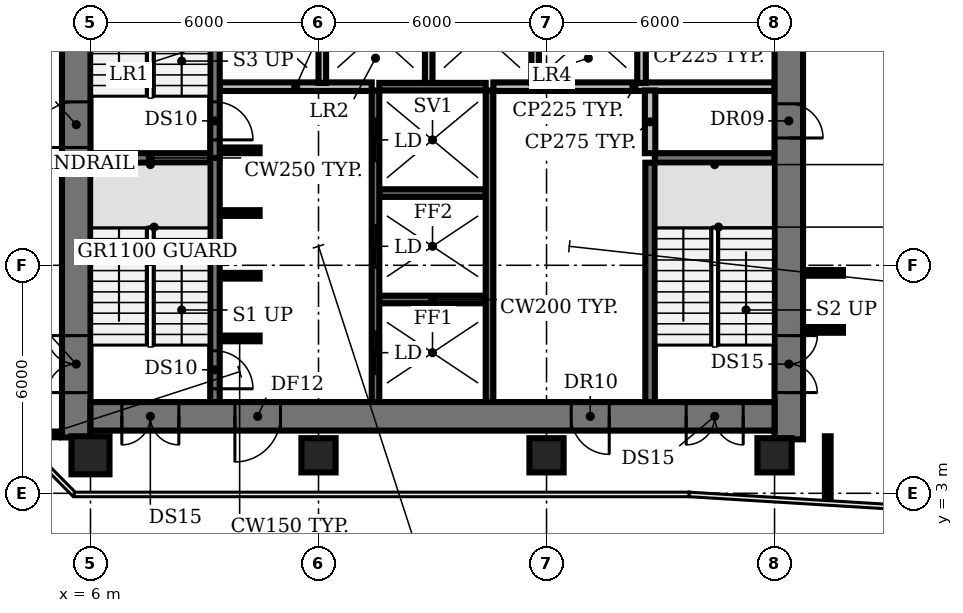
"""IFC4 building model, lengths in metres.
Left out: names, types, materials, properties, quantities, classifications, styles, units other than length and angle.
Written with IfcOpenShell. Run it as: python <this file> out.ifc"""

import sys

from ifc_helpers import new_model, si_unit, direction, frame, frame_2d, origin, origin_2d, place, context, subcontext, project, spatial, rectangle, circle, extrude, element, fill, save


model = new_model("IFC4")
c1 = context("Model", 3, precision=1e-05, world=origin(), true_north=direction((0.0, 1.0)))
c2 = subcontext(c1, "Body", "Model", "MODEL_VIEW")
j1 = project(units=[si_unit("LENGTHUNIT", "METRE"), si_unit("PLANEANGLEUNIT", "RADIAN")], contexts=[c1])
p1 = place(None, origin())
s1 = spatial("IfcSite", under=j1, at=p1, CompositionType="ELEMENT")
p2 = place(p1, origin())
s2 = spatial("IfcBuilding", under=s1, at=p2, CompositionType="ELEMENT")
p3 = place(p2, frame((0.0, 0.0, 125.6)))
s3 = spatial("IfcBuildingStorey", under=s2, at=p3, CompositionType="ELEMENT", Elevation=125.6)
p4 = place(p3, frame((6.0, 4.0, 0.0), z_axis=(0.0, 0.0, 1.0), x_axis=(1.0, 0.0, 0.0)))
e1 = element("IfcColumn", 1, at=p4, inside=s3, PredefinedType="COLUMN", context=c2, shape_type="SweptSolid", body=[
    extrude(circle(Radius=0.5, at=origin_2d()), origin(), (0.0, 0.0, 1.0), 3.85),
])
for number, where, z_axis, x_axis in (
    (2, (12.0, 4.0, 0.0), (0.0, 0.0, 1.0), (1.0, 0.0, 0.0)),
    (3, (18.0, 4.0, 0.0), (0.0, 0.0, 1.0), (1.0, 0.0, 0.0)),
    (4, (24.0, 4.0, 0.0), (0.0, 0.0, 1.0), (1.0, 0.0, 0.0)),
):
    element("IfcColumn", number, at=place(p3, frame(where, z_axis=z_axis, x_axis=x_axis)), inside=s3, PredefinedType="COLUMN", context=c2, shape_type="SweptSolid", body=[
        extrude(rectangle(XDim=0.9, YDim=0.9, at=origin_2d()), origin(), (0.0, 0.0, 1.0), 3.85),
    ])
p5 = place(p3, frame((9.4, 7.075, 0.0), z_axis=(0.0, 0.0, 1.0), x_axis=(1.0, 0.0, 0.0)))
e5 = element("IfcWall", 5, at=p5, inside=s3, PredefinedType="SHEAR", context=c2, shape_type="SweptSolid", body=[
    extrude(rectangle(XDim=1.05, YDim=0.15, at=frame_2d((0.525, 0.0))), origin(), (0.0, 0.0, 1.0), 3.85),
])
p6 = place(p3, frame((13.6, 8.1, 0.0), z_axis=(0.0, 0.0, 1.0), x_axis=(1.0, 0.0, 0.0)))
e6 = element("IfcWall", 6, at=p6, inside=s3, PredefinedType="SHEAR", context=c2, shape_type="SweptSolid", body=[
    extrude(rectangle(XDim=2.8, YDim=0.2, at=frame_2d((1.4, 0.0))), origin(), (0.0, 0.0, 1.0), 3.85),
])
for number, where, z_axis, x_axis in (
    (7, (9.4, 8.725, 0.0), (0.0, 0.0, 1.0), (1.0, 0.0, 0.0)),
    (8, (9.4, 10.375, 0.0), (0.0, 0.0, 1.0), (1.0, 0.0, 0.0)),
):
    element("IfcWall", number, at=place(p3, frame(where, z_axis=z_axis, x_axis=x_axis)), inside=s3, PredefinedType="SHEAR", context=c2, shape_type="SweptSolid", body=[
        extrude(rectangle(XDim=1.05, YDim=0.15, at=frame_2d((0.525, 0.0))), origin(), (0.0, 0.0, 1.0), 3.85),
    ])
p7 = place(p3, frame((13.6, 10.9, 0.0), z_axis=(0.0, 0.0, 1.0), x_axis=(1.0, 0.0, 0.0)))
e9 = element("IfcWall", 9, at=p7, inside=s3, PredefinedType="SHEAR", context=c2, shape_type="SweptSolid", body=[
    extrude(rectangle(XDim=2.8, YDim=0.2, at=frame_2d((1.4, 0.0))), origin(), (0.0, 0.0, 1.0), 3.85),
])
for number, where, z_axis, x_axis in (
    (10, (6.0, 11.825, 0.0), (0.0, 0.0, 1.0), (1.0, 0.0, 0.0)),
    (11, (20.85, 11.825, 0.0), (0.0, 0.0, 1.0), (1.0, 0.0, 0.0)),
):
    element("IfcWall", number, at=place(p3, frame(where, z_axis=z_axis, x_axis=x_axis)), inside=s3, PredefinedType="SHEAR", context=c2, shape_type="SweptSolid", body=[
        extrude(rectangle(XDim=3.15, YDim=0.25, at=frame_2d((1.575, 0.0))), origin(), (0.0, 0.0, 1.0), 3.85),
    ])
p8 = place(p3, frame((9.4, 12.025, 0.0), z_axis=(0.0, 0.0, 1.0), x_axis=(1.0, 0.0, 0.0)))
e12 = element("IfcWall", 12, at=p8, inside=s3, PredefinedType="SHEAR", context=c2, shape_type="SweptSolid", body=[
    extrude(rectangle(XDim=1.05, YDim=0.15, at=frame_2d((0.525, 0.0))), origin(), (0.0, 0.0, 1.0), 3.85),
])
p9 = place(p3, frame((9.4, 13.7, 0.0), z_axis=(0.0, 0.0, 1.0), x_axis=(1.0, 0.0, 0.0)))
e13 = element("IfcWall", 13, at=p9, inside=s3, PredefinedType="PARTITIONING", context=c2, shape_type="SweptSolid", body=[
    extrude(rectangle(XDim=4.0, YDim=0.225, at=frame_2d((2.0, 0.0))), origin(), (0.0, 0.0, 1.0), 3.85),
])
p10 = place(p3, frame((13.6, 13.7, 0.0), z_axis=(0.0, 0.0, 1.0), x_axis=(1.0, 0.0, 0.0)))
e14 = element("IfcWall", 14, at=p10, inside=s3, PredefinedType="SHEAR", context=c2, shape_type="SweptSolid", body=[
    extrude(rectangle(XDim=2.8, YDim=0.2, at=frame_2d((1.4, 0.0))), origin(), (0.0, 0.0, 1.0), 3.85),
])
p11 = place(p3, frame((16.6, 13.7, 0.0), z_axis=(0.0, 0.0, 1.0), x_axis=(1.0, 0.0, 0.0)))
e15 = element("IfcWall", 15, at=p11, inside=s3, PredefinedType="PARTITIONING", context=c2, shape_type="SweptSolid", body=[
    extrude(rectangle(XDim=7.4, YDim=0.225, at=frame_2d((3.7, 0.0))), origin(), (0.0, 0.0, 1.0), 3.85),
])
p12 = place(p3, frame((9.275, 11.825, 0.0), z_axis=(0.0, 0.0, 1.0), x_axis=(0.0, -1.0, 0.0)))
e16 = element("IfcWall", 16, at=p12, inside=s3, PredefinedType="SHEAR", context=c2, shape_type="SweptSolid", body=[
    extrude(rectangle(XDim=6.425, YDim=0.25, at=frame_2d((3.212, 0.0))), origin(), (0.0, 0.0, 1.0), 3.85),
])
p13 = place(p12, frame((5.075, 0.0, 0.0)))
e17 = element("IfcOpeningElement", 17, at=p13, cuts=e16, PredefinedType="OPENING", context=c2, shape_type="SweptSolid", body=[
    extrude(rectangle(XDim=1.0, YDim=2.1, at=frame_2d((0.5, 1.05))), frame((0.0, 0.135, 0.0), z_axis=(0.0, -1.0, 0.0), x_axis=(1.0, 0.0, 0.0)), (0.0, 0.0, 1.0), 0.27),
])
p14 = place(p3, frame((9.275, 18.375, 0.0), z_axis=(0.0, 0.0, 1.0), x_axis=(0.0, -1.0, 0.0)))
e18 = element("IfcWall", 18, at=p14, inside=s3, PredefinedType="SHEAR", context=c2, shape_type="SweptSolid", body=[
    extrude(rectangle(XDim=6.55, YDim=0.25, at=frame_2d((3.275, 0.0))), origin(), (0.0, 0.0, 1.0), 3.85),
])
p15 = place(p14, frame((5.075, 0.0, 0.0)))
e19 = element("IfcOpeningElement", 19, at=p15, cuts=e18, PredefinedType="OPENING", context=c2, shape_type="SweptSolid", body=[
    extrude(rectangle(XDim=1.0, YDim=2.1, at=frame_2d((0.5, 1.05))), frame((0.0, 0.135, 0.0), z_axis=(0.0, -1.0, 0.0), x_axis=(1.0, 0.0, 0.0)), (0.0, 0.0, 1.0), 0.27),
])
p16 = place(p3, frame((12.1, 13.8, 0.0), z_axis=(0.0, 0.0, 1.0), x_axis=(0.0, 1.0, 0.0)))
e20 = element("IfcWall", 20, at=p16, inside=s3, PredefinedType="SOLIDWALL", context=c2, shape_type="SweptSolid", body=[
    extrude(rectangle(XDim=2.6, YDim=0.2, at=frame_2d((1.3, 0.0))), origin(), (0.0, 0.0, 1.0), 3.85),
])
p17 = place(p3, frame((13.5, 5.4, 0.0), z_axis=(0.0, 0.0, 1.0), x_axis=(0.0, 1.0, 0.0)))
e21 = element("IfcWall", 21, at=p17, inside=s3, PredefinedType="SHEAR", context=c2, shape_type="SweptSolid", body=[
    extrude(rectangle(XDim=8.2, YDim=0.2, at=frame_2d((4.1, 0.0))), origin(), (0.0, 0.0, 1.0), 3.85),
])
p18 = place(p17, frame((0.75, 0.0, 0.0)))
e22 = element("IfcOpeningElement", 22, at=p18, cuts=e21, PredefinedType="OPENING", context=c2, shape_type="SweptSolid", body=[
    extrude(rectangle(XDim=1.1, YDim=2.1, at=frame_2d((0.55, 1.05))), frame((0.0, 0.11, 0.0), z_axis=(0.0, -1.0, 0.0), x_axis=(1.0, 0.0, 0.0)), (0.0, 0.0, 1.0), 0.22),
])
p19 = place(p17, frame((3.55, 0.0, 0.0)))
e23 = element("IfcOpeningElement", 23, at=p19, cuts=e21, PredefinedType="OPENING", context=c2, shape_type="SweptSolid", body=[
    extrude(rectangle(XDim=1.1, YDim=2.1, at=frame_2d((0.55, 1.05))), frame((0.0, 0.11, 0.0), z_axis=(0.0, -1.0, 0.0), x_axis=(1.0, 0.0, 0.0)), (0.0, 0.0, 1.0), 0.22),
])
p20 = place(p17, frame((6.35, 0.0, 0.0)))
e24 = element("IfcOpeningElement", 24, at=p20, cuts=e21, PredefinedType="OPENING", context=c2, shape_type="SweptSolid", body=[
    extrude(rectangle(XDim=1.1, YDim=2.1, at=frame_2d((0.55, 1.05))), frame((0.0, 0.11, 0.0), z_axis=(0.0, -1.0, 0.0), x_axis=(1.0, 0.0, 0.0)), (0.0, 0.0, 1.0), 0.22),
])
p21 = place(p3, frame((14.9, 13.8, 0.0), z_axis=(0.0, 0.0, 1.0), x_axis=(0.0, 1.0, 0.0)))
e25 = element("IfcWall", 25, at=p21, inside=s3, PredefinedType="SOLIDWALL", context=c2, shape_type="SweptSolid", body=[
    extrude(rectangle(XDim=2.6, YDim=0.2, at=frame_2d((1.3, 0.0))), origin(), (0.0, 0.0, 1.0), 3.85),
])
p22 = place(p3, frame((16.5, 5.4, 0.0), z_axis=(0.0, 0.0, 1.0), x_axis=(0.0, 1.0, 0.0)))
e26 = element("IfcWall", 26, at=p22, inside=s3, PredefinedType="SHEAR", context=c2, shape_type="SweptSolid", body=[
    extrude(rectangle(XDim=8.2, YDim=0.2, at=frame_2d((4.1, 0.0))), origin(), (0.0, 0.0, 1.0), 3.85),
])
p23 = place(p3, frame((17.7, 13.8, 0.0), z_axis=(0.0, 0.0, 1.0), x_axis=(0.0, 1.0, 0.0)))
e27 = element("IfcWall", 27, at=p23, inside=s3, PredefinedType="SOLIDWALL", context=c2, shape_type="SweptSolid", body=[
    extrude(rectangle(XDim=2.6, YDim=0.2, at=frame_2d((1.3, 0.0))), origin(), (0.0, 0.0, 1.0), 3.85),
])
p24 = place(p3, frame((20.5, 13.8, 0.0), z_axis=(0.0, 0.0, 1.0), x_axis=(0.0, 1.0, 0.0)))
e28 = element("IfcWall", 28, at=p24, inside=s3, PredefinedType="PARTITIONING", context=c2, shape_type="SweptSolid", body=[
    extrude(rectangle(XDim=2.6, YDim=0.225, at=frame_2d((1.3, 0.0))), origin(), (0.0, 0.0, 1.0), 3.85),
])
p25 = place(p3, frame((20.725, 5.4, 0.0), z_axis=(0.0, 0.0, 1.0), x_axis=(0.0, 1.0, 0.0)))
e29 = element("IfcWall", 29, at=p25, inside=s3, PredefinedType="SHEAR", context=c2, shape_type="SweptSolid", body=[
    extrude(rectangle(XDim=6.3, YDim=0.25, at=frame_2d((3.15, 0.0))), origin(), (0.0, 0.0, 1.0), 3.85),
])
p26 = place(p3, frame((20.725, 11.95, 0.0), z_axis=(0.0, 0.0, 1.0), x_axis=(0.0, 1.0, 0.0)))
e30 = element("IfcWall", 30, at=p26, inside=s3, PredefinedType="PARTITIONING", context=c2, shape_type="SweptSolid", body=[
    extrude(rectangle(XDim=1.65, YDim=0.275, at=frame_2d((0.825, 0.0))), origin(), (0.0, 0.0, 1.0), 3.85),
])
p27 = place(p3, frame((5.625, 4.47, 0.0), z_axis=(0.0, 0.0, 1.0), x_axis=(0.0, 1.0, 0.0)))
e31 = element("IfcWall", 31, at=p27, inside=s3, PredefinedType="SHEAR", context=c2, shape_type="SweptSolid", body=[
    extrude(rectangle(XDim=21.08, YDim=0.75, at=frame_2d((10.54, 0.0))), origin(), (0.0, 0.0, 1.0), 3.85),
])
p28 = place(p27, frame((1.18, 0.0, 0.0)))
e32 = element("IfcOpeningElement", 32, at=p28, cuts=e31, PredefinedType="OPENING", context=c2, shape_type="SweptSolid", body=[
    extrude(rectangle(XDim=1.5, YDim=2.1, at=frame_2d((0.75, 1.05))), frame((0.0, 0.385, 0.0), z_axis=(0.0, -1.0, 0.0), x_axis=(1.0, 0.0, 0.0)), (0.0, 0.0, 1.0), 0.77),
])
p29 = place(p27, frame((7.63, 0.0, 0.0)))
e33 = element("IfcOpeningElement", 33, at=p29, cuts=e31, PredefinedType="OPENING", context=c2, shape_type="SweptSolid", body=[
    extrude(rectangle(XDim=1.2, YDim=2.1, at=frame_2d((0.6, 1.05))), frame((0.0, 0.385, 0.0), z_axis=(0.0, -1.0, 0.0), x_axis=(1.0, 0.0, 0.0)), (0.0, 0.0, 1.0), 0.77),
])
p30 = place(p27, frame((14.18, 0.0, 0.0)))
e34 = element("IfcOpeningElement", 34, at=p30, cuts=e31, PredefinedType="OPENING", context=c2, shape_type="SweptSolid", body=[
    extrude(rectangle(XDim=1.2, YDim=2.1, at=frame_2d((0.6, 1.05))), frame((0.0, 0.385, 0.0), z_axis=(0.0, -1.0, 0.0), x_axis=(1.0, 0.0, 0.0)), (0.0, 0.0, 1.0), 0.77),
])
p31 = place(p3, frame((24.375, 25.55, 0.0), z_axis=(0.0, 0.0, 1.0), x_axis=(0.0, -1.0, 0.0)))
e35 = element("IfcWall", 35, at=p31, inside=s3, PredefinedType="SHEAR", context=c2, shape_type="SweptSolid", body=[
    extrude(rectangle(XDim=21.13, YDim=0.75, at=frame_2d((10.565, 0.0))), origin(), (0.0, 0.0, 1.0), 3.85),
])
p32 = place(p31, frame((18.4, 0.0, 0.0)))
e36 = element("IfcOpeningElement", 36, at=p32, cuts=e35, PredefinedType="OPENING", context=c2, shape_type="SweptSolid", body=[
    extrude(rectangle(XDim=1.5, YDim=2.1, at=frame_2d((0.75, 1.05))), frame((0.0, 0.385, 0.0), z_axis=(0.0, -1.0, 0.0), x_axis=(1.0, 0.0, 0.0)), (0.0, 0.0, 1.0), 0.77),
])
p33 = place(p31, frame((12.3, 0.0, 0.0)))
e37 = element("IfcOpeningElement", 37, at=p33, cuts=e35, PredefinedType="OPENING", context=c2, shape_type="SweptSolid", body=[
    extrude(rectangle(XDim=0.9, YDim=2.1, at=frame_2d((0.45, 1.05))), frame((0.0, 0.385, 0.0), z_axis=(0.0, -1.0, 0.0), x_axis=(1.0, 0.0, 0.0)), (0.0, 0.0, 1.0), 0.77),
])
p34 = place(p31, frame((6.3, 0.0, 0.0)))
e38 = element("IfcOpeningElement", 38, at=p34, cuts=e35, PredefinedType="OPENING", context=c2, shape_type="SweptSolid", body=[
    extrude(rectangle(XDim=2.0, YDim=2.1, at=frame_2d((1.0, 1.05))), frame((0.0, 0.385, 0.0), z_axis=(0.0, -1.0, 0.0), x_axis=(1.0, 0.0, 0.0)), (0.0, 0.0, 1.0), 0.77),
])
p35 = place(p3, frame((24.0, 5.025, 0.0), z_axis=(0.0, 0.0, 1.0), x_axis=(-1.0, 0.0, 0.0)))
e39 = element("IfcWall", 39, at=p35, inside=s3, PredefinedType="SHEAR", context=c2, shape_type="SweptSolid", body=[
    extrude(rectangle(XDim=18.0, YDim=0.75, at=frame_2d((9.0, 0.0))), origin(), (0.0, 0.0, 1.0), 3.85),
])
p36 = place(p35, frame((0.825, 0.0, 0.0)))
e40 = element("IfcOpeningElement", 40, at=p36, cuts=e39, PredefinedType="OPENING", context=c2, shape_type="SweptSolid", body=[
    extrude(rectangle(XDim=1.5, YDim=2.1, at=frame_2d((0.75, 1.05))), frame((0.0, 0.385, 0.0), z_axis=(0.0, -1.0, 0.0), x_axis=(1.0, 0.0, 0.0)), (0.0, 0.0, 1.0), 0.77),
])
p37 = place(p35, frame((15.675, 0.0, 0.0)))
e41 = element("IfcOpeningElement", 41, at=p37, cuts=e39, PredefinedType="OPENING", context=c2, shape_type="SweptSolid", body=[
    extrude(rectangle(XDim=1.5, YDim=2.1, at=frame_2d((0.75, 1.05))), frame((0.0, 0.385, 0.0), z_axis=(0.0, -1.0, 0.0), x_axis=(1.0, 0.0, 0.0)), (0.0, 0.0, 1.0), 0.77),
])
p38 = place(p35, frame((13.0, 0.0, 0.0)))
e42 = element("IfcOpeningElement", 42, at=p38, cuts=e39, PredefinedType="OPENING", context=c2, shape_type="SweptSolid", body=[
    extrude(rectangle(XDim=1.2, YDim=2.1, at=frame_2d((0.6, 1.05))), frame((0.0, 0.385, 0.0), z_axis=(0.0, -1.0, 0.0), x_axis=(1.0, 0.0, 0.0)), (0.0, 0.0, 1.0), 0.77),
])
p39 = place(p35, frame((4.35, 0.0, 0.0)))
e43 = element("IfcOpeningElement", 43, at=p39, cuts=e39, PredefinedType="OPENING", context=c2, shape_type="SweptSolid", body=[
    extrude(rectangle(XDim=1.0, YDim=2.1, at=frame_2d((0.5, 1.05))), frame((0.0, 0.385, 0.0), z_axis=(0.0, -1.0, 0.0), x_axis=(1.0, 0.0, 0.0)), (0.0, 0.0, 1.0), 0.77),
])
p40 = place(p3, frame((4.08, 4.55, 0.0), z_axis=(0.0, 0.0, 1.0), x_axis=(1.0, 0.0, 0.0)))
e44 = element("IfcWall", 44, at=p40, inside=s3, PredefinedType="PARTITIONING", context=c2, shape_type="SweptSolid", body=[
    extrude(rectangle(XDim=1.07, YDim=0.15, at=frame_2d((0.535, 0.0))), origin(), (0.0, 0.0, 1.0), 2.83),
])
for number, where, z_axis, x_axis in (
    (45, (24.75, 7.3, 0.0), (0.0, 0.0, 1.0), (1.0, 0.0, 0.0)),
    (46, (24.75, 8.8, 0.0), (0.0, 0.0, 1.0), (1.0, 0.0, 0.0)),
):
    element("IfcWall", number, at=place(p3, frame(where, z_axis=z_axis, x_axis=x_axis)), inside=s3, PredefinedType="PARTITIONING", context=c2, shape_type="SweptSolid", body=[
        extrude(rectangle(XDim=1.05, YDim=0.15, at=frame_2d((0.525, 0.0))), origin(), (0.0, 0.0, 1.0), 2.83),
    ])
p41 = place(p3, frame((25.4, 2.8, 0.0), z_axis=(0.0, 0.0, 1.0), x_axis=(0.0, 1.0, 0.0)))
e47 = element("IfcWall", 47, at=p41, inside=s3, PredefinedType="PARTITIONING", context=c2, shape_type="SweptSolid", body=[
    extrude(rectangle(XDim=1.7, YDim=0.15, at=frame_2d((0.85, 0.0))), origin(), (0.0, 0.0, 1.0), 2.83),
])
p42 = place(p13, origin())
e48 = element("IfcDoor", 48, at=p42, inside=s3, OperationType="SINGLE_SWING_RIGHT", PredefinedType="DOOR", context=c2, shape_type="SweptSolid", body=[
    extrude(rectangle(XDim=1.0, YDim=2.1, at=frame_2d((0.5, 1.05))), frame((0.0, 0.025, 0.0), z_axis=(0.0, -1.0, 0.0), x_axis=(1.0, 0.0, 0.0)), (0.0, 0.0, 1.0), 0.05),
])
fill(e17, e48)
p43 = place(p15, origin())
e49 = element("IfcDoor", 49, at=p43, inside=s3, OperationType="SINGLE_SWING_RIGHT", PredefinedType="DOOR", context=c2, shape_type="SweptSolid", body=[
    extrude(rectangle(XDim=1.0, YDim=2.1, at=frame_2d((0.5, 1.05))), frame((0.0, 0.025, 0.0), z_axis=(0.0, -1.0, 0.0), x_axis=(1.0, 0.0, 0.0)), (0.0, 0.0, 1.0), 0.05),
])
fill(e19, e49)
p44 = place(p18, origin())
e50 = element("IfcDoor", 50, at=p44, inside=s3, OperationType="DOUBLE_DOOR_SLIDING", PredefinedType="DOOR", context=c2, shape_type="SweptSolid", body=[
    extrude(rectangle(XDim=1.1, YDim=2.1, at=frame_2d((0.55, 1.05))), frame((0.0, 0.025, 0.0), z_axis=(0.0, -1.0, 0.0), x_axis=(1.0, 0.0, 0.0)), (0.0, 0.0, 1.0), 0.05),
])
fill(e22, e50)
p45 = place(p19, origin())
e51 = element("IfcDoor", 51, at=p45, inside=s3, OperationType="DOUBLE_DOOR_SLIDING", PredefinedType="DOOR", context=c2, shape_type="SweptSolid", body=[
    extrude(rectangle(XDim=1.1, YDim=2.1, at=frame_2d((0.55, 1.05))), frame((0.0, 0.025, 0.0), z_axis=(0.0, -1.0, 0.0), x_axis=(1.0, 0.0, 0.0)), (0.0, 0.0, 1.0), 0.05),
])
fill(e23, e51)
p46 = place(p20, origin())
e52 = element("IfcDoor", 52, at=p46, inside=s3, OperationType="DOUBLE_DOOR_SLIDING", PredefinedType="DOOR", context=c2, shape_type="SweptSolid", body=[
    extrude(rectangle(XDim=1.1, YDim=2.1, at=frame_2d((0.55, 1.05))), frame((0.0, 0.025, 0.0), z_axis=(0.0, -1.0, 0.0), x_axis=(1.0, 0.0, 0.0)), (0.0, 0.0, 1.0), 0.05),
])
fill(e24, e52)
p47 = place(p28, origin())
e53 = element("IfcDoor", 53, at=p47, inside=s3, OperationType="DOUBLE_DOOR_SINGLE_SWING", PredefinedType="DOOR", context=c2, shape_type="SweptSolid", body=[
    extrude(rectangle(XDim=1.5, YDim=2.1, at=frame_2d((0.75, 1.05))), frame((0.0, 0.025, 0.0), z_axis=(0.0, -1.0, 0.0), x_axis=(1.0, 0.0, 0.0)), (0.0, 0.0, 1.0), 0.05),
])
fill(e32, e53)
p48 = place(p29, origin())
e54 = element("IfcDoor", 54, at=p48, inside=s3, OperationType="SINGLE_SWING_LEFT", PredefinedType="DOOR", context=c2, shape_type="SweptSolid", body=[
    extrude(rectangle(XDim=1.2, YDim=2.1, at=frame_2d((0.6, 1.05))), frame((0.0, 0.025, 0.0), z_axis=(0.0, -1.0, 0.0), x_axis=(1.0, 0.0, 0.0)), (0.0, 0.0, 1.0), 0.05),
])
fill(e33, e54)
p49 = place(p32, origin())
e55 = element("IfcDoor", 55, at=p49, inside=s3, OperationType="DOUBLE_DOOR_SINGLE_SWING", PredefinedType="DOOR", context=c2, shape_type="SweptSolid", body=[
    extrude(rectangle(XDim=1.5, YDim=2.1, at=frame_2d((0.75, 1.05))), frame((0.0, 0.025, 0.0), z_axis=(0.0, -1.0, 0.0), x_axis=(1.0, 0.0, 0.0)), (0.0, 0.0, 1.0), 0.05),
])
fill(e36, e55)
p50 = place(p33, origin())
e56 = element("IfcDoor", 56, at=p50, inside=s3, OperationType="SINGLE_SWING_RIGHT", PredefinedType="DOOR", context=c2, shape_type="SweptSolid", body=[
    extrude(rectangle(XDim=0.9, YDim=2.1, at=frame_2d((0.45, 1.05))), frame((0.0, -0.315, 0.0), z_axis=(0.0, -1.0, 0.0), x_axis=(1.0, 0.0, 0.0)), (0.0, 0.0, 1.0), 0.05),
])
fill(e37, e56)
p51 = place(p36, origin())
e57 = element("IfcDoor", 57, at=p51, inside=s3, OperationType="DOUBLE_DOOR_SINGLE_SWING", PredefinedType="DOOR", context=c2, shape_type="SweptSolid", body=[
    extrude(rectangle(XDim=1.5, YDim=2.1, at=frame_2d((0.75, 1.05))), frame((0.0, 0.025, 0.0), z_axis=(0.0, -1.0, 0.0), x_axis=(1.0, 0.0, 0.0)), (0.0, 0.0, 1.0), 0.05),
])
fill(e40, e57)
p52 = place(p37, origin())
e58 = element("IfcDoor", 58, at=p52, inside=s3, OperationType="DOUBLE_DOOR_SINGLE_SWING", PredefinedType="DOOR", context=c2, shape_type="SweptSolid", body=[
    extrude(rectangle(XDim=1.5, YDim=2.1, at=frame_2d((0.75, 1.05))), frame((0.0, 0.025, 0.0), z_axis=(0.0, -1.0, 0.0), x_axis=(1.0, 0.0, 0.0)), (0.0, 0.0, 1.0), 0.05),
])
fill(e41, e58)
p53 = place(p38, origin())
e59 = element("IfcDoor", 59, at=p53, inside=s3, OperationType="SINGLE_SWING_RIGHT", PredefinedType="DOOR", context=c2, shape_type="SweptSolid", body=[
    extrude(rectangle(XDim=1.2, YDim=2.1, at=frame_2d((0.6, 1.05))), frame((0.0, 0.025, 0.0), z_axis=(0.0, -1.0, 0.0), x_axis=(1.0, 0.0, 0.0)), (0.0, 0.0, 1.0), 0.05),
])
fill(e42, e59)
p54 = place(p39, origin())
e60 = element("IfcDoor", 60, at=p54, inside=s3, OperationType="SINGLE_SWING_LEFT", PredefinedType="DOOR", context=c2, shape_type="SweptSolid", body=[
    extrude(rectangle(XDim=1.0, YDim=2.1, at=frame_2d((0.5, 1.05))), frame((0.0, -0.315, 0.0), z_axis=(0.0, -1.0, 0.0), x_axis=(1.0, 0.0, 0.0)), (0.0, 0.0, 1.0), 0.05),
])
fill(e43, e60)
save(model, sys.argv[1])
